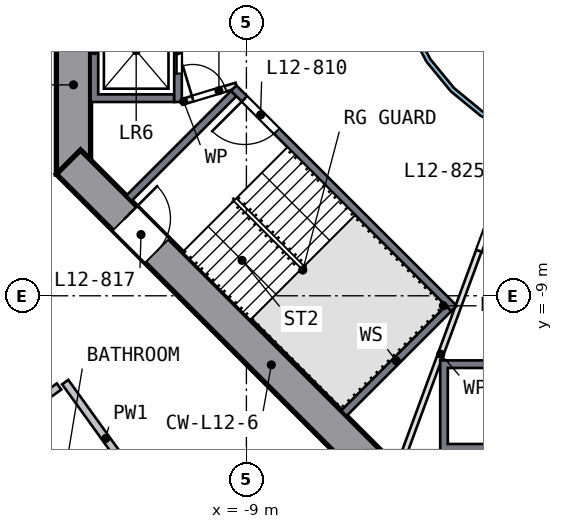
"""IFC4 building model, lengths in metres.
Left out: names, types, materials, properties, quantities, classifications, styles, units other than length and angle.
Written with IfcOpenShell. Run it as: python <this file> out.ifc"""

import sys

from ifc_helpers import new_model, si_unit, direction, frame, frame_2d, origin, place, context, subcontext, project, spatial, polyline, rectangle, outline, extrude, element, fill, save


model = new_model("IFC4")
c1 = context("Model", 3, precision=1e-05, world=origin(), true_north=direction((0.0, 1.0)))
c2 = subcontext(c1, "Body", "Model", "MODEL_VIEW")
j1 = project(units=[si_unit("LENGTHUNIT", "METRE"), si_unit("PLANEANGLEUNIT", "RADIAN")], contexts=[c1])
p1 = place(None, origin())
s1 = spatial("IfcSite", under=j1, at=p1, CompositionType="ELEMENT")
p2 = place(p1, origin())
s2 = spatial("IfcBuilding", under=s1, at=p2, CompositionType="ELEMENT")
p3 = place(p2, frame((0.0, 0.0, 56.5)))
s3 = spatial("IfcBuildingStorey", under=s2, at=p3, CompositionType="ELEMENT", Elevation=56.5)
p4 = place(p3, frame((-13.55, 5.799, 0.0), z_axis=(0.0, 0.0, 1.0), x_axis=(0.0, -1.0, 0.0)))
e1 = element("IfcWall", 1, at=p4, inside=s3, PredefinedType="SHEAR", context=c2, shape_type="SweptSolid", body=[
    extrude(rectangle(XDim=11.598, YDim=0.9, at=frame_2d((5.799, 0.0))), origin(), (0.0, 0.0, 1.0), 3.5),
])
p5 = place(p4, frame((4.899, 0.0, 0.0)))
e2 = element("IfcOpeningElement", 2, at=p5, cuts=e1, PredefinedType="OPENING", context=c2, shape_type="SweptSolid", body=[
    extrude(rectangle(XDim=1.8, YDim=2.1, at=frame_2d((0.9, 1.05))), frame((0.0, 0.46, 0.0), z_axis=(0.0, -1.0, 0.0), x_axis=(1.0, 0.0, 0.0)), (0.0, 0.0, 1.0), 0.92),
])
p6 = place(p3, frame((-13.682, -5.481, 0.0), z_axis=(0.0, 0.0, 1.0), x_axis=(0.707106781, -0.707106781, 0.0)))
e3 = element("IfcWall", 3, at=p6, inside=s3, PredefinedType="SHEAR", context=c2, shape_type="SweptSolid", body=[
    extrude(rectangle(XDim=11.598, YDim=0.9, at=frame_2d((5.799, 0.0))), origin(), (0.0, 0.0, 1.0), 3.5),
])
p7 = place(p6, frame((2.099, 0.0, 0.0)))
e4 = element("IfcOpeningElement", 4, at=p7, cuts=e3, PredefinedType="OPENING", context=c2, shape_type="SweptSolid", body=[
    extrude(rectangle(XDim=1.2, YDim=2.1, at=frame_2d((0.6, 1.05))), frame((0.0, 0.46, 0.0), z_axis=(0.0, -1.0, 0.0), x_axis=(1.0, 0.0, 0.0)), (0.0, 0.0, 1.0), 0.92),
])
p8 = place(p3, origin())
e5 = element("IfcWall", 5, at=p8, inside=s3, PredefinedType="SOLIDWALL", context=c2, shape_type="SweptSolid", body=[
    extrude(outline(polyline([(-13.1, -3.9), (-13.1, -1.2), (-10.9, -1.2), (-10.9, -1.4), (-12.9, -1.4), (-12.9, -3.7), (-10.9, -3.7), (-10.9, -3.9), (-13.1, -3.9)])), origin(), (0.0, 0.0, 1.0), 3.19),
])
p9 = place(p3, frame((-10.8, -1.2, 0.0), z_axis=(0.0, 0.0, 1.0), x_axis=(0.0, -1.0, 0.0)))
e6 = element("IfcWall", 6, at=p9, inside=s3, PredefinedType="SOLIDWALL", context=c2, shape_type="SweptSolid", body=[
    extrude(rectangle(XDim=2.7, YDim=0.2, at=frame_2d((1.35, 0.0))), origin(), (0.0, 0.0, 1.0), 3.19),
])
p10 = place(p9, frame((0.75, 0.0, 0.0)))
e7 = element("IfcOpeningElement", 7, at=p10, cuts=e6, PredefinedType="OPENING", context=c2, shape_type="SweptSolid", body=[
    extrude(rectangle(XDim=1.2, YDim=2.1, at=frame_2d((0.6, 1.05))), frame((0.0, 0.11, 0.0), z_axis=(0.0, -1.0, 0.0), x_axis=(1.0, 0.0, 0.0)), (0.0, 0.0, 1.0), 0.22),
])
p11 = place(p3, origin())
e8 = element("IfcWall", 8, at=p11, inside=s3, PredefinedType="SOLIDWALL", context=c2, shape_type="SweptSolid", body=[
    extrude(outline(polyline([(-1.2, -13.1), (-3.9, -13.1), (-3.9, -10.7), (-1.2, -10.7), (-1.2, -13.1)]), holes=[polyline([(-3.7, -10.9), (-3.7, -12.9), (-1.4, -12.9), (-1.4, -10.9), (-3.7, -10.9)])]), origin(), (0.0, 0.0, 1.0), 3.19),
])
p12 = place(p3, frame((-3.535, -9.334, 0.0), z_axis=(0.0, 0.0, 1.0), x_axis=(-0.707106781, 0.707106781, 0.0)))
e9 = element("IfcWall", 9, at=p12, inside=s3, PredefinedType="SOLIDWALL", context=c2, shape_type="SweptSolid", body=[
    extrude(rectangle(XDim=8.2, YDim=0.2, at=frame_2d((4.1, 0.0))), origin(), (0.0, 0.0, 1.0), 3.19),
])
p13 = place(p12, frame((6.6, 0.0, 0.0)))
e10 = element("IfcOpeningElement", 10, at=p13, cuts=e9, PredefinedType="OPENING", context=c2, shape_type="SweptSolid", body=[
    extrude(rectangle(XDim=1.2, YDim=2.1, at=frame_2d((0.6, 1.05))), frame((0.0, 0.11, 0.0), z_axis=(0.0, -1.0, 0.0), x_axis=(1.0, 0.0, 0.0)), (0.0, 0.0, 1.0), 0.22),
])
for number, where, z_axis, x_axis in (
    (11, (-9.334, -3.677, 0.0), (0.0, 0.0, 1.0), (-0.707, -0.707, 0.0)),
    (12, (-3.677, -9.334, 0.0), (0.0, 0.0, 1.0), (-0.707, -0.707, 0.0)),
):
    element("IfcWall", number, at=place(p3, frame(where, z_axis=z_axis, x_axis=x_axis)), inside=s3, PredefinedType="SOLIDWALL", context=c2, shape_type="SweptSolid", body=[
        extrude(rectangle(XDim=3.9, YDim=0.2, at=frame_2d((1.95, 0.0))), origin(), (0.0, 0.0, 1.0), 3.19),
    ])
p14 = place(p3, frame((-10.7, -3.9, 0.0), z_axis=(0.0, 0.0, 1.0), x_axis=(0.957084567, 0.289808785, 0.0)))
e13 = element("IfcWall", 13, at=p14, inside=s3, PredefinedType="PARTITIONING", context=c2, shape_type="SweptSolid", body=[
    extrude(rectangle(XDim=1.501, YDim=0.15, at=frame_2d((0.75, 0.0))), origin(), (0.0, 0.0, 1.0), 3.19),
])
p15 = place(p14, frame((0.301, 0.0, 0.0)))
e14 = element("IfcOpeningElement", 14, at=p15, cuts=e13, PredefinedType="OPENING", context=c2, shape_type="SweptSolid", body=[
    extrude(rectangle(XDim=0.9, YDim=2.1, at=frame_2d((0.45, 1.05))), frame((0.0, 0.085, 0.0), z_axis=(0.0, -1.0, 0.0), x_axis=(1.0, 0.0, 0.0)), (0.0, 0.0, 1.0), 0.17),
])
p16 = place(p3, frame((-1.776, -4.813, 0.0), z_axis=(0.0, 0.0, 1.0), x_axis=(-0.346112737, -0.93819293, 0.0)))
e15 = element("IfcWall", 15, at=p16, inside=s3, PredefinedType="PARTITIONING", context=c2, shape_type="SweptSolid", body=[
    extrude(rectangle(XDim=8.803, YDim=0.15, at=frame_2d((4.402, 0.0))), origin(), (0.0, 0.0, 1.0), 3.19),
])
p17 = place(p16, frame((1.4, 0.0, 0.0)))
e16 = element("IfcOpeningElement", 16, at=p17, cuts=e15, PredefinedType="OPENING", context=c2, shape_type="SweptSolid", body=[
    extrude(rectangle(XDim=1.8, YDim=2.1, at=frame_2d((0.9, 1.05))), frame((0.0, 0.085, 0.0), z_axis=(0.0, -1.0, 0.0), x_axis=(1.0, 0.0, 0.0)), (0.0, 0.0, 1.0), 0.17),
])
p18 = place(p3, origin())
e17 = element("IfcWall", 17, at=p18, inside=s3, PredefinedType="SOLIDWALL", context=c2, shape_type="SweptSolid", body=[
    extrude(outline(polyline([(5.021, -0.999), (4.73, -1.959), (4.257, -2.844), (3.62, -3.62), (2.844, -4.257), (1.959, -4.73), (0.999, -5.021), (0.0, -5.12), (-0.999, -5.021), (-1.959, -4.73), (-2.844, -4.257), (-3.62, -3.62), (-4.257, -2.844), (-4.73, -1.959), (-5.021, -0.999), (-5.12, 0.0), (-5.021, 0.999), (-4.73, 1.959), (-4.257, 2.844), (-3.62, 3.62), (-2.844, 4.257), (-1.959, 4.73), (-0.999, 5.021), (0.0, 5.12), (0.999, 5.021), (1.959, 4.73), (2.844, 4.257), (3.62, 3.62), (4.257, 2.844), (4.73, 1.959), (5.021, 0.999), (5.12, 0.0), (5.021, -0.999)]), holes=[polyline([(4.904, 0.976), (4.619, 1.913), (4.157, 2.778), (3.535, 3.535), (2.778, 4.157), (1.913, 4.619), (0.976, 4.904), (0.0, 5.0), (-0.976, 4.904), (-1.913, 4.619), (-2.778, 4.157), (-3.535, 3.535), (-4.157, 2.778), (-4.619, 1.913), (-4.904, 0.976), (-5.0, 0.0), (-4.904, -0.976), (-4.619, -1.913), (-4.157, -2.778), (-3.535, -3.535), (-2.778, -4.157), (-1.913, -4.619), (-0.976, -4.904), (0.0, -5.0), (0.976, -4.904), (1.913, -4.619), (2.778, -4.157), (3.535, -3.535), (4.157, -2.778), (4.619, -1.913), (4.904, -0.976), (5.0, 0.0), (4.904, 0.976)])]), origin(), (0.0, 0.0, 1.0), 3.19),
])
p19 = place(p3, frame((-13.93, -11.387, 0.0), z_axis=(0.0, 0.0, 1.0), x_axis=(-0.811463307, -0.584403373, 0.0)))
e18 = element("IfcWall", 18, at=p19, inside=s3, PredefinedType="SOLIDWALL", context=c2, shape_type="SweptSolid", body=[
    extrude(rectangle(XDim=13.691, YDim=0.2, at=frame_2d((6.845, 0.0))), origin(), (0.0, 0.0, 1.0), 3.19),
])
p20 = place(p19, frame((12.085, 0.0, 0.0)))
e19 = element("IfcOpeningElement", 19, at=p20, cuts=e18, PredefinedType="OPENING", context=c2, shape_type="SweptSolid", body=[
    extrude(rectangle(XDim=0.9, YDim=2.1, at=frame_2d((0.45, 1.05))), frame((0.0, 0.11, 0.0), z_axis=(0.0, -1.0, 0.0), x_axis=(1.0, 0.0, 0.0)), (0.0, 0.0, 1.0), 0.22),
])
p21 = place(p19, frame((6.85, 0.0, 0.0)))
e20 = element("IfcOpeningElement", 20, at=p21, cuts=e18, PredefinedType="OPENING", context=c2, shape_type="SweptSolid", body=[
    extrude(rectangle(XDim=1.0, YDim=2.1, at=frame_2d((0.5, 1.05))), frame((0.0, 0.11, 0.0), z_axis=(0.0, -1.0, 0.0), x_axis=(1.0, 0.0, 0.0)), (0.0, 0.0, 1.0), 0.22),
])
p22 = place(p3, frame((-13.768, -11.271, 0.0), z_axis=(0.0, 0.0, 1.0), x_axis=(0.58441548, -0.811454587, 0.0)))
e21 = element("IfcWall", 21, at=p22, inside=s3, PredefinedType="SOLIDWALL", context=c2, shape_type="SweptSolid", body=[
    extrude(rectangle(XDim=3.658, YDim=0.2, at=frame_2d((1.829, 0.0))), origin(), (0.0, 0.0, 1.0), 3.19),
])
p23 = place(p10, origin())
e22 = element("IfcDoor", 22, at=p23, inside=s3, OperationType="DOUBLE_DOOR_SLIDING", PredefinedType="DOOR", context=c2, shape_type="SweptSolid", body=[
    extrude(rectangle(XDim=1.2, YDim=2.1, at=frame_2d((0.6, 1.05))), frame((0.0, 0.025, 0.0), z_axis=(0.0, -1.0, 0.0), x_axis=(1.0, 0.0, 0.0)), (0.0, 0.0, 1.0), 0.05),
])
fill(e7, e22)
p24 = place(p13, origin())
e23 = element("IfcDoor", 23, at=p24, inside=s3, OperationType="SINGLE_SWING_RIGHT", PredefinedType="DOOR", context=c2, shape_type="SweptSolid", body=[
    extrude(rectangle(XDim=1.2, YDim=2.1, at=frame_2d((0.6, 1.05))), frame((0.0, 0.025, 0.0), z_axis=(0.0, -1.0, 0.0), x_axis=(1.0, 0.0, 0.0)), (0.0, 0.0, 1.0), 0.05),
])
fill(e10, e23)
p25 = place(p7, origin())
e24 = element("IfcDoor", 24, at=p25, inside=s3, OperationType="SINGLE_SWING_LEFT", PredefinedType="DOOR", context=c2, shape_type="SweptSolid", body=[
    extrude(rectangle(XDim=1.2, YDim=2.1, at=frame_2d((0.6, 1.05))), frame((0.0, 0.025, 0.0), z_axis=(0.0, -1.0, 0.0), x_axis=(1.0, 0.0, 0.0)), (0.0, 0.0, 1.0), 0.05),
])
fill(e4, e24)
p26 = place(p15, origin())
e25 = element("IfcDoor", 25, at=p26, inside=s3, OperationType="SINGLE_SWING_LEFT", PredefinedType="DOOR", context=c2, shape_type="SweptSolid", body=[
    extrude(rectangle(XDim=0.9, YDim=2.1, at=frame_2d((0.45, 1.05))), frame((0.0, 0.025, 0.0), z_axis=(0.0, -1.0, 0.0), x_axis=(1.0, 0.0, 0.0)), (0.0, 0.0, 1.0), 0.05),
])
fill(e14, e25)
p27 = place(p17, origin())
e26 = element("IfcDoor", 26, at=p27, inside=s3, OperationType="DOUBLE_DOOR_SINGLE_SWING", PredefinedType="DOOR", context=c2, shape_type="SweptSolid", body=[
    extrude(rectangle(XDim=1.8, YDim=2.1, at=frame_2d((0.9, 1.05))), frame((0.0, 0.025, 0.0), z_axis=(0.0, -1.0, 0.0), x_axis=(1.0, 0.0, 0.0)), (0.0, 0.0, 1.0), 0.05),
])
fill(e16, e26)
save(model, sys.argv[1])
